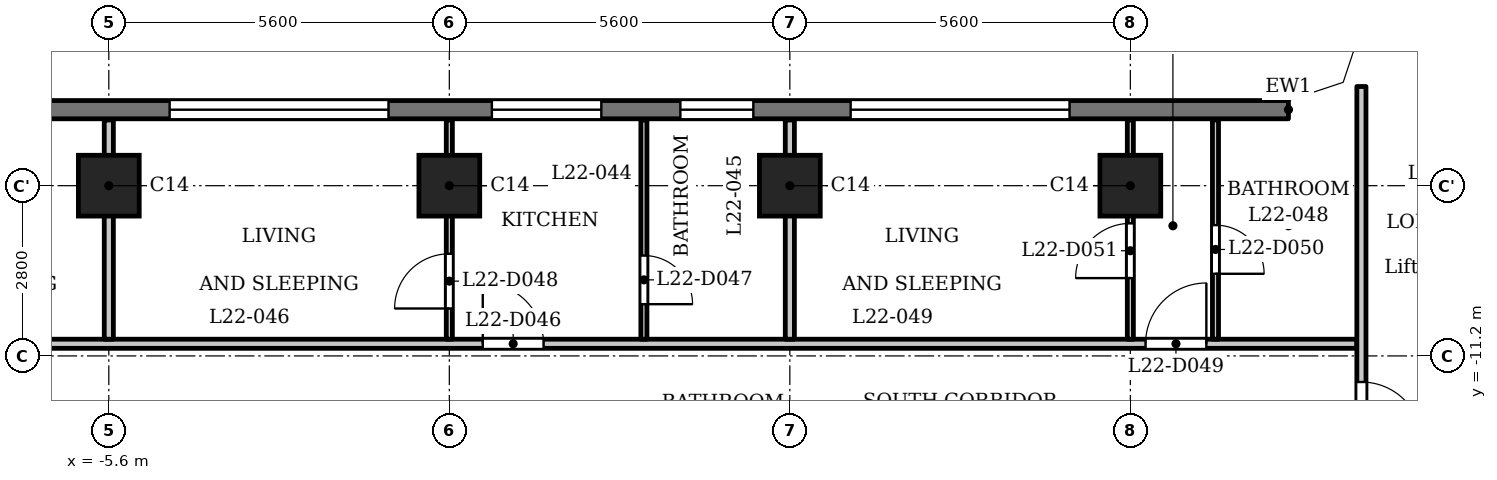
"""IFC4 building model, lengths in metres.
Left out: names, types, materials, properties, quantities, classifications, styles, units other than length and angle.
Written with IfcOpenShell. Run it as: python <this file> out.ifc"""

import sys

from ifc_helpers import new_model, si_unit, direction, frame, frame_2d, origin, origin_2d, place, context, subcontext, project, spatial, polyline, rectangle, outline, extrude, element, fill, save


model = new_model("IFC4")
c1 = context("Model", 3, precision=1e-05, world=origin(), true_north=direction((0.0, 1.0)))
c2 = subcontext(c1, "Body", "Model", "MODEL_VIEW")
j1 = project(units=[si_unit("LENGTHUNIT", "METRE"), si_unit("PLANEANGLEUNIT", "RADIAN")], contexts=[c1])
p1 = place(None, origin())
s1 = spatial("IfcSite", under=j1, at=p1, CompositionType="ELEMENT")
p2 = place(p1, origin())
s2 = spatial("IfcBuilding", under=s1, at=p2, CompositionType="ELEMENT")
p3 = place(p2, frame((0.0, 0.0, 90.3)))
s3 = spatial("IfcBuildingStorey", under=s2, at=p3, CompositionType="ELEMENT", Elevation=90.3)
for number, where, z_axis, x_axis in (
    (1, (-5.6, -8.4, 0.0), (0.0, 0.0, 1.0), (1.0, 0.0, 0.0)),
    (2, (0.0, -8.4, 0.0), (0.0, 0.0, 1.0), (1.0, 0.0, 0.0)),
    (3, (5.6, -8.4, 0.0), (0.0, 0.0, 1.0), (1.0, 0.0, 0.0)),
    (4, (11.2, -8.4, 0.0), (0.0, 0.0, 1.0), (1.0, 0.0, 0.0)),
):
    element("IfcColumn", number, at=place(p3, frame(where, z_axis=z_axis, x_axis=x_axis)), inside=s3, PredefinedType="COLUMN", context=c2, shape_type="SweptSolid", body=[
        extrude(rectangle(XDim=1.0, YDim=1.0, at=origin_2d()), origin(), (0.0, 0.0, 1.0), 3.5),
    ])
p4 = place(p3, frame((13.8, -7.15, 0.0), z_axis=(0.0, 0.0, 1.0), x_axis=(-1.0, 0.0, 0.0)))
e5 = element("IfcWall", 5, at=p4, inside=s3, PredefinedType="SOLIDWALL", context=c2, shape_type="SweptSolid", body=[
    extrude(rectangle(XDim=27.6, YDim=0.3, at=frame_2d((13.8, 0.0))), origin(), (0.0, 0.0, 1.0), 3.2),
])
p5 = place(p4, frame((3.6, 0.0, 1.2)))
e6 = element("IfcOpeningElement", 6, at=p5, cuts=e5, PredefinedType="OPENING", context=c2, shape_type="SweptSolid", body=[
    extrude(rectangle(XDim=3.6, YDim=0.95, at=frame_2d((1.8, 0.475))), frame((0.0, 0.16, 0.0), z_axis=(0.0, -1.0, 0.0), x_axis=(1.0, 0.0, 0.0)), (0.0, 0.0, 1.0), 0.32),
])
p6 = place(p4, frame((8.8, 0.0, 0.6)))
e7 = element("IfcOpeningElement", 7, at=p6, cuts=e5, PredefinedType="OPENING", context=c2, shape_type="SweptSolid", body=[
    extrude(rectangle(XDim=1.2, YDim=1.55, at=frame_2d((0.6, 0.775))), frame((0.0, 0.16, 0.0), z_axis=(0.0, -1.0, 0.0), x_axis=(1.0, 0.0, 0.0)), (0.0, 0.0, 1.0), 0.32),
])
p7 = place(p4, frame((11.3, 0.0, 0.9)))
e8 = element("IfcOpeningElement", 8, at=p7, cuts=e5, PredefinedType="OPENING", context=c2, shape_type="SweptSolid", body=[
    extrude(rectangle(XDim=1.8, YDim=1.25, at=frame_2d((0.9, 0.625))), frame((0.0, 0.16, 0.0), z_axis=(0.0, -1.0, 0.0), x_axis=(1.0, 0.0, 0.0)), (0.0, 0.0, 1.0), 0.32),
])
p8 = place(p4, frame((14.8, 0.0, 1.2)))
e9 = element("IfcOpeningElement", 9, at=p8, cuts=e5, PredefinedType="OPENING", context=c2, shape_type="SweptSolid", body=[
    extrude(rectangle(XDim=3.6, YDim=0.95, at=frame_2d((1.8, 0.475))), frame((0.0, 0.16, 0.0), z_axis=(0.0, -1.0, 0.0), x_axis=(1.0, 0.0, 0.0)), (0.0, 0.0, 1.0), 0.32),
])
p9 = place(p4, frame((20.4, 0.0, 1.2)))
e10 = element("IfcOpeningElement", 10, at=p9, cuts=e5, PredefinedType="OPENING", context=c2, shape_type="SweptSolid", body=[
    extrude(rectangle(XDim=3.6, YDim=0.95, at=frame_2d((1.8, 0.475))), frame((0.0, 0.16, 0.0), z_axis=(0.0, -1.0, 0.0), x_axis=(1.0, 0.0, 0.0)), (0.0, 0.0, 1.0), 0.32),
])
p10 = place(p3, frame((-14.925, -11.0, 0.0), z_axis=(0.0, 0.0, 1.0), x_axis=(1.0, 0.0, 0.0)))
e11 = element("IfcWall", 11, at=p10, inside=s3, PredefinedType="PARTITIONING", context=c2, shape_type="SweptSolid", body=[
    extrude(rectangle(XDim=29.85, YDim=0.15, at=frame_2d((14.925, 0.0))), origin(), (0.0, 0.0, 1.0), 3.2),
])
p11 = place(p10, frame((2.575, 0.0, 0.0)))
e12 = element("IfcOpeningElement", 12, at=p11, cuts=e11, PredefinedType="OPENING", context=c2, shape_type="SweptSolid", body=[
    extrude(rectangle(XDim=1.0, YDim=2.1, at=frame_2d((0.5, 1.05))), frame((0.0, 0.085, 0.0), z_axis=(0.0, -1.0, 0.0), x_axis=(1.0, 0.0, 0.0)), (0.0, 0.0, 1.0), 0.17),
])
p12 = place(p10, frame((15.475, 0.0, 0.0)))
e13 = element("IfcOpeningElement", 13, at=p12, cuts=e11, PredefinedType="OPENING", context=c2, shape_type="SweptSolid", body=[
    extrude(rectangle(XDim=1.0, YDim=2.1, at=frame_2d((0.5, 1.05))), frame((0.0, 0.085, 0.0), z_axis=(0.0, -1.0, 0.0), x_axis=(1.0, 0.0, 0.0)), (0.0, 0.0, 1.0), 0.17),
])
p13 = place(p10, frame((26.375, 0.0, 0.0)))
e14 = element("IfcOpeningElement", 14, at=p13, cuts=e11, PredefinedType="OPENING", context=c2, shape_type="SweptSolid", body=[
    extrude(rectangle(XDim=1.0, YDim=2.1, at=frame_2d((0.5, 1.05))), frame((0.0, 0.085, 0.0), z_axis=(0.0, -1.0, 0.0), x_axis=(1.0, 0.0, 0.0)), (0.0, 0.0, 1.0), 0.17),
])
p14 = place(p3, frame((-5.6, -10.925, 0.0), z_axis=(0.0, 0.0, 1.0), x_axis=(0.0, 1.0, 0.0)))
e15 = element("IfcWall", 15, at=p14, inside=s3, PredefinedType="PARTITIONING", context=c2, shape_type="SweptSolid", body=[
    extrude(rectangle(XDim=3.605, YDim=0.15, at=frame_2d((1.802, 0.0))), origin(), (0.0, 0.0, 1.0), 3.2),
])
p15 = place(p3, frame((0.0, -10.925, 0.0), z_axis=(0.0, 0.0, 1.0), x_axis=(0.0, 1.0, 0.0)))
e16 = element("IfcWall", 16, at=p15, inside=s3, PredefinedType="PARTITIONING", context=c2, shape_type="SweptSolid", body=[
    extrude(rectangle(XDim=3.605, YDim=0.1, at=frame_2d((1.802, 0.0))), origin(), (0.0, 0.0, 1.0), 3.2),
])
p16 = place(p15, frame((0.505, 0.0, 0.0)))
e17 = element("IfcOpeningElement", 17, at=p16, cuts=e16, PredefinedType="OPENING", context=c2, shape_type="SweptSolid", body=[
    extrude(rectangle(XDim=0.9, YDim=2.1, at=frame_2d((0.45, 1.05))), frame((0.0, 0.06, 0.0), z_axis=(0.0, -1.0, 0.0), x_axis=(1.0, 0.0, 0.0)), (0.0, 0.0, 1.0), 0.12),
])
p17 = place(p3, frame((3.2, -10.925, 0.0), z_axis=(0.0, 0.0, 1.0), x_axis=(0.0, 1.0, 0.0)))
e18 = element("IfcWall", 18, at=p17, inside=s3, PredefinedType="PARTITIONING", context=c2, shape_type="SweptSolid", body=[
    extrude(rectangle(XDim=3.605, YDim=0.1, at=frame_2d((1.802, 0.0))), origin(), (0.0, 0.0, 1.0), 3.2),
])
p18 = place(p17, frame((0.576, 0.0, 0.0)))
e19 = element("IfcOpeningElement", 19, at=p18, cuts=e18, PredefinedType="OPENING", context=c2, shape_type="SweptSolid", body=[
    extrude(rectangle(XDim=0.8, YDim=2.1, at=frame_2d((0.4, 1.05))), frame((0.0, 0.06, 0.0), z_axis=(0.0, -1.0, 0.0), x_axis=(1.0, 0.0, 0.0)), (0.0, 0.0, 1.0), 0.12),
])
p19 = place(p3, frame((5.6, -10.925, 0.0), z_axis=(0.0, 0.0, 1.0), x_axis=(0.0, 1.0, 0.0)))
e20 = element("IfcWall", 20, at=p19, inside=s3, PredefinedType="PARTITIONING", context=c2, shape_type="SweptSolid", body=[
    extrude(rectangle(XDim=3.605, YDim=0.15, at=frame_2d((1.802, 0.0))), origin(), (0.0, 0.0, 1.0), 3.2),
])
p20 = place(p3, frame((11.2, -10.925, 0.0), z_axis=(0.0, 0.0, 1.0), x_axis=(0.0, 1.0, 0.0)))
e21 = element("IfcWall", 21, at=p20, inside=s3, PredefinedType="PARTITIONING", context=c2, shape_type="SweptSolid", body=[
    extrude(rectangle(XDim=3.605, YDim=0.1, at=frame_2d((1.802, 0.0))), origin(), (0.0, 0.0, 1.0), 3.2),
])
p21 = place(p20, frame((1.005, 0.0, 0.0)))
e22 = element("IfcOpeningElement", 22, at=p21, cuts=e21, PredefinedType="OPENING", context=c2, shape_type="SweptSolid", body=[
    extrude(rectangle(XDim=0.9, YDim=2.1, at=frame_2d((0.45, 1.05))), frame((0.0, 0.06, 0.0), z_axis=(0.0, -1.0, 0.0), x_axis=(1.0, 0.0, 0.0)), (0.0, 0.0, 1.0), 0.12),
])
p22 = place(p3, frame((12.6, -10.925, 0.0), z_axis=(0.0, 0.0, 1.0), x_axis=(0.0, 1.0, 0.0)))
e23 = element("IfcWall", 23, at=p22, inside=s3, PredefinedType="PARTITIONING", context=c2, shape_type="SweptSolid", body=[
    extrude(rectangle(XDim=3.605, YDim=0.1, at=frame_2d((1.802, 0.0))), origin(), (0.0, 0.0, 1.0), 3.2),
])
p23 = place(p22, frame((1.076, 0.0, 0.0)))
e24 = element("IfcOpeningElement", 24, at=p23, cuts=e23, PredefinedType="OPENING", context=c2, shape_type="SweptSolid", body=[
    extrude(rectangle(XDim=0.8, YDim=2.1, at=frame_2d((0.4, 1.05))), frame((0.0, 0.06, 0.0), z_axis=(0.0, -1.0, 0.0), x_axis=(1.0, 0.0, 0.0)), (0.0, 0.0, 1.0), 0.12),
])
p24 = place(p3, frame((15.0, -13.125, 0.0), z_axis=(0.0, 0.0, 1.0), x_axis=(0.0, 1.0, 0.0)))
e25 = element("IfcWall", 25, at=p24, inside=s3, PredefinedType="PARTITIONING", context=c2, shape_type="SweptSolid", body=[
    extrude(rectangle(XDim=6.356, YDim=0.15, at=frame_2d((3.178, 0.0))), origin(), (0.0, 0.0, 1.0), 3.2),
])
p25 = place(p24, frame((0.496, 0.0, 0.0)))
e26 = element("IfcOpeningElement", 26, at=p25, cuts=e25, PredefinedType="OPENING", context=c2, shape_type="SweptSolid", body=[
    extrude(rectangle(XDim=1.0, YDim=2.1, at=frame_2d((0.5, 1.05))), frame((0.0, 0.085, 0.0), z_axis=(0.0, -1.0, 0.0), x_axis=(1.0, 0.0, 0.0)), (0.0, 0.0, 1.0), 0.17),
])
p26 = place(p3, origin())
e27 = element("IfcWall", 27, at=p26, inside=s3, PredefinedType="SOLIDWALL", context=c2, shape_type="SweptSolid", body=[
    extrude(outline(polyline([(14.937, -6.937), (15.3, -5.849), (15.3, -5.8), (15.0, -5.8), (14.7, -6.7), (13.8, -7.0), (13.8, -7.3), (13.849, -7.3), (14.937, -6.937)])), origin(), (0.0, 0.0, 1.0), 3.2),
])
p27 = place(p25, origin())
e28 = element("IfcDoor", 28, at=p27, inside=s3, OperationType="SINGLE_SWING_LEFT", PredefinedType="DOOR", context=c2, shape_type="SweptSolid", body=[
    extrude(rectangle(XDim=1.0, YDim=2.1, at=frame_2d((0.5, 1.05))), frame((0.0, 0.025, 0.0), z_axis=(0.0, -1.0, 0.0), x_axis=(1.0, 0.0, 0.0)), (0.0, 0.0, 1.0), 0.05),
])
fill(e26, e28)
p28 = place(p12, origin())
e29 = element("IfcDoor", 29, at=p28, inside=s3, OperationType="SINGLE_SWING_RIGHT", PredefinedType="DOOR", context=c2, shape_type="SweptSolid", body=[
    extrude(rectangle(XDim=1.0, YDim=2.1, at=frame_2d((0.5, 1.05))), frame((0.0, 0.025, 0.0), z_axis=(0.0, -1.0, 0.0), x_axis=(1.0, 0.0, 0.0)), (0.0, 0.0, 1.0), 0.05),
])
fill(e13, e29)
p29 = place(p18, origin())
e30 = element("IfcDoor", 30, at=p29, inside=s3, OperationType="SINGLE_SWING_LEFT", PredefinedType="DOOR", context=c2, shape_type="SweptSolid", body=[
    extrude(rectangle(XDim=0.8, YDim=2.1, at=frame_2d((0.4, 1.05))), frame((0.0, 0.025, 0.0), z_axis=(0.0, -1.0, 0.0), x_axis=(1.0, 0.0, 0.0)), (0.0, 0.0, 1.0), 0.05),
])
fill(e19, e30)
p30 = place(p16, origin())
e31 = element("IfcDoor", 31, at=p30, inside=s3, OperationType="SINGLE_SWING_RIGHT", PredefinedType="DOOR", context=c2, shape_type="SweptSolid", body=[
    extrude(rectangle(XDim=0.9, YDim=2.1, at=frame_2d((0.45, 1.05))), frame((0.0, 0.025, 0.0), z_axis=(0.0, -1.0, 0.0), x_axis=(1.0, 0.0, 0.0)), (0.0, 0.0, 1.0), 0.05),
])
fill(e17, e31)
p31 = place(p13, origin())
e32 = element("IfcDoor", 32, at=p31, inside=s3, OperationType="SINGLE_SWING_LEFT", PredefinedType="DOOR", context=c2, shape_type="SweptSolid", body=[
    extrude(rectangle(XDim=1.0, YDim=2.1, at=frame_2d((0.5, 1.05))), frame((0.0, 0.025, 0.0), z_axis=(0.0, -1.0, 0.0), x_axis=(1.0, 0.0, 0.0)), (0.0, 0.0, 1.0), 0.05),
])
fill(e14, e32)
p32 = place(p23, origin())
e33 = element("IfcDoor", 33, at=p32, inside=s3, OperationType="SINGLE_SWING_LEFT", PredefinedType="DOOR", context=c2, shape_type="SweptSolid", body=[
    extrude(rectangle(XDim=0.8, YDim=2.1, at=frame_2d((0.4, 1.05))), frame((0.0, 0.025, 0.0), z_axis=(0.0, -1.0, 0.0), x_axis=(1.0, 0.0, 0.0)), (0.0, 0.0, 1.0), 0.05),
])
fill(e24, e33)
p33 = place(p21, origin())
e34 = element("IfcDoor", 34, at=p33, inside=s3, OperationType="SINGLE_SWING_RIGHT", PredefinedType="DOOR", context=c2, shape_type="SweptSolid", body=[
    extrude(rectangle(XDim=0.9, YDim=2.1, at=frame_2d((0.45, 1.05))), frame((0.0, 0.025, 0.0), z_axis=(0.0, -1.0, 0.0), x_axis=(1.0, 0.0, 0.0)), (0.0, 0.0, 1.0), 0.05),
])
fill(e22, e34)
p34 = place(p5, origin())
e35 = element("IfcWindow", 35, at=p34, inside=s3, PartitioningType="SINGLE_PANEL", PredefinedType="WINDOW", context=c2, shape_type="SweptSolid", body=[
    extrude(rectangle(XDim=3.6, YDim=0.95, at=frame_2d((1.8, 0.475))), frame((0.0, 0.03, 0.0), z_axis=(0.0, -1.0, 0.0), x_axis=(1.0, 0.0, 0.0)), (0.0, 0.0, 1.0), 0.06),
])
fill(e6, e35)
p35 = place(p6, origin())
e36 = element("IfcWindow", 36, at=p35, inside=s3, PartitioningType="SINGLE_PANEL", PredefinedType="WINDOW", context=c2, shape_type="SweptSolid", body=[
    extrude(rectangle(XDim=1.2, YDim=1.55, at=frame_2d((0.6, 0.775))), frame((0.0, 0.03, 0.0), z_axis=(0.0, -1.0, 0.0), x_axis=(1.0, 0.0, 0.0)), (0.0, 0.0, 1.0), 0.06),
])
fill(e7, e36)
p36 = place(p7, origin())
e37 = element("IfcWindow", 37, at=p36, inside=s3, PartitioningType="SINGLE_PANEL", PredefinedType="WINDOW", context=c2, shape_type="SweptSolid", body=[
    extrude(rectangle(XDim=1.8, YDim=1.25, at=frame_2d((0.9, 0.625))), frame((0.0, 0.03, 0.0), z_axis=(0.0, -1.0, 0.0), x_axis=(1.0, 0.0, 0.0)), (0.0, 0.0, 1.0), 0.06),
])
fill(e8, e37)
p37 = place(p8, origin())
e38 = element("IfcWindow", 38, at=p37, inside=s3, PartitioningType="SINGLE_PANEL", PredefinedType="WINDOW", context=c2, shape_type="SweptSolid", body=[
    extrude(rectangle(XDim=3.6, YDim=0.95, at=frame_2d((1.8, 0.475))), frame((0.0, 0.03, 0.0), z_axis=(0.0, -1.0, 0.0), x_axis=(1.0, 0.0, 0.0)), (0.0, 0.0, 1.0), 0.06),
])
fill(e9, e38)
save(model, sys.argv[1])
